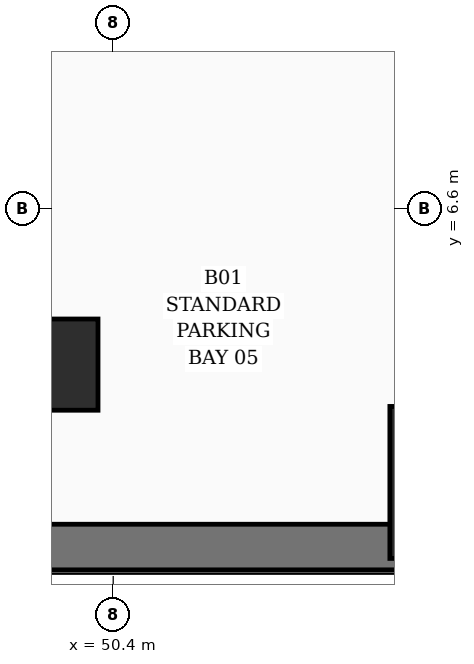
"""IFC4 building model, lengths in metres.
Left out: names, types, materials, properties, quantities, classifications, styles, units other than length and angle.
Written with IfcOpenShell. Run it as: python <this file> out.ifc"""

import sys

from ifc_helpers import new_model, si_unit, direction, frame, frame_2d, origin, origin_2d, place, context, subcontext, project, spatial, rectangle, circle, extrude, element, save


model = new_model("IFC4")
c1 = context("Model", 3, precision=1e-05, world=origin(), true_north=direction((0.0, 1.0)))
c2 = subcontext(c1, "Body", "Model", "MODEL_VIEW")
j1 = project(units=[si_unit("LENGTHUNIT", "METRE"), si_unit("PLANEANGLEUNIT", "RADIAN")], contexts=[c1])
p1 = place(None, origin())
s1 = spatial("IfcSite", under=j1, at=p1, CompositionType="ELEMENT")
p2 = place(p1, origin())
s2 = spatial("IfcBuilding", under=s1, at=p2, CompositionType="ELEMENT")
p3 = place(p2, frame((0.0, 0.0, -4.5)))
s3 = spatial("IfcBuildingStorey", under=s2, at=p3, CompositionType="ELEMENT", Elevation=-4.5)
p4 = place(p3, frame((45.303, 2.15, 0.0), z_axis=(0.0, 0.0, 1.0), x_axis=(1.0, 0.0, 0.0)))
e1 = element("IfcWall", 1, at=p4, inside=s3, PredefinedType="USERDEFINED", context=c2, shape_type="SweptSolid", body=[
    extrude(rectangle(XDim=9.173, YDim=0.6, at=frame_2d((4.586, 0.0))), origin(), (0.0, 0.0, 1.0), 4.5),
])
p5 = place(p3, frame((49.6, 4.55, 0.0), z_axis=(0.0, 0.0, 1.0), x_axis=(1.0, 0.0, 0.0)))
e2 = element("IfcColumn", 2, at=p5, inside=s3, PredefinedType="COLUMN", context=c2, shape_type="SweptSolid", body=[
    extrude(rectangle(XDim=1.2, YDim=1.2, at=origin_2d()), origin(), (0.0, 0.0, 1.0), 4.5),
])
p6 = place(p3, frame((55.04, 3.0, 0.0), z_axis=(0.0, 0.0, 1.0), x_axis=(1.0, 0.0, 0.0)))
e3 = element("IfcColumn", 3, at=p6, inside=s3, PredefinedType="COLUMN", context=c2, shape_type="SweptSolid", body=[
    extrude(circle(Radius=1.0, at=origin_2d()), origin(), (0.0, 0.0, 1.0), 4.5),
])
save(model, sys.argv[1])
